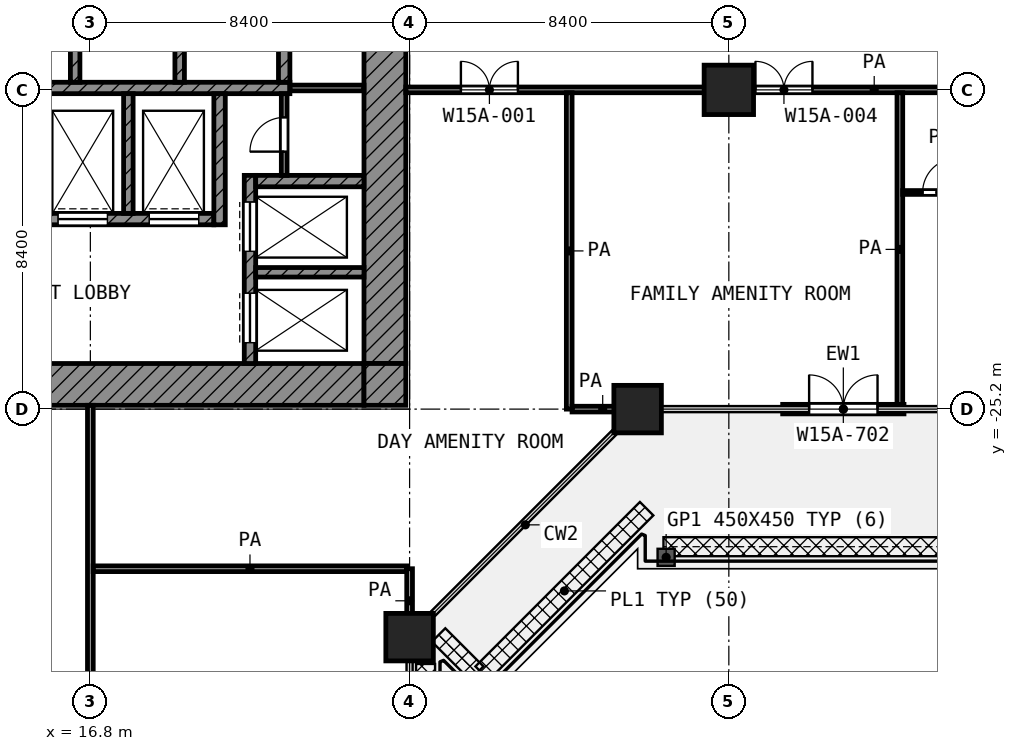
"""IFC4 building model, lengths in metres.
Left out: names, types, materials, properties, quantities, classifications, styles, units other than length and angle.
Written with IfcOpenShell. Run it as: python <this file> out.ifc"""

import sys

from ifc_helpers import new_model, si_unit, direction, frame, frame_2d, origin, origin_2d, place, context, subcontext, project, spatial, rectangle, extrude, element, fill, save


model = new_model("IFC4")
c1 = context("Model", 3, precision=1e-05, world=origin(), true_north=direction((0.0, 1.0)))
c2 = subcontext(c1, "Body", "Model", "MODEL_VIEW")
j1 = project(units=[si_unit("LENGTHUNIT", "METRE"), si_unit("PLANEANGLEUNIT", "RADIAN")], contexts=[c1])
p1 = place(None, origin())
s1 = spatial("IfcSite", under=j1, at=p1, CompositionType="ELEMENT")
p2 = place(p1, origin())
s2 = spatial("IfcBuilding", under=s1, at=p2, CompositionType="ELEMENT")
p3 = place(p2, frame((0.0, 0.0, 68.6)))
s3 = spatial("IfcBuildingStorey", under=s2, at=p3, CompositionType="ELEMENT", Elevation=68.6)
p4 = place(p3, frame((33.6, -16.8, 0.0), z_axis=(0.0, 0.0, 1.0), x_axis=(1.0, 0.0, 0.0)))
e1 = element("IfcColumn", 1, at=p4, inside=s3, PredefinedType="COLUMN", context=c2, shape_type="SweptSolid", body=[
    extrude(rectangle(XDim=1.3, YDim=1.3, at=origin_2d()), origin(), (0.0, 0.0, 1.0), 4.2),
])
for number, where, z_axis, x_axis in (
    (2, (31.2, -25.2, 0.0), (0.0, 0.0, 1.0), (1.0, 0.0, 0.0)),
    (3, (25.2, -31.2, 0.0), (0.0, 0.0, 1.0), (1.0, 0.0, 0.0)),
):
    element("IfcColumn", number, at=place(p3, frame(where, z_axis=z_axis, x_axis=x_axis)), inside=s3, PredefinedType="COLUMN", context=c2, shape_type="SweptSolid", body=[
        extrude(rectangle(XDim=1.25, YDim=1.25, at=origin_2d()), origin(), (0.0, 0.0, 1.0), 4.2),
    ])
p5 = place(p3, frame((35.017, -25.2, 0.0), z_axis=(0.0, 0.0, 1.0), x_axis=(1.0, 0.0, 0.0)))
e4 = element("IfcWall", 4, at=p5, inside=s3, PredefinedType="SOLIDWALL", context=c2, shape_type="SweptSolid", body=[
    extrude(rectangle(XDim=3.192, YDim=0.25, at=frame_2d((1.596, 0.0))), origin(), (0.0, 0.0, 1.0), 3.78),
])
p6 = place(p5, frame((0.696, 0.0, 0.0)))
e5 = element("IfcOpeningElement", 5, at=p6, cuts=e4, PredefinedType="OPENING", context=c2, shape_type="SweptSolid", body=[
    extrude(rectangle(XDim=1.8, YDim=2.1, at=frame_2d((0.9, 1.05))), frame((0.0, 0.135, 0.0), z_axis=(0.0, -1.0, 0.0), x_axis=(1.0, 0.0, 0.0)), (0.0, 0.0, 1.0), 0.27),
])
p7 = place(p3, frame((24.55, -24.0, 0.0), z_axis=(0.0, 0.0, 1.0), x_axis=(0.0, 1.0, 0.0)))
e6 = element("IfcWall", 6, at=p7, inside=s3, PredefinedType="SHEAR", context=c2, shape_type="SweptSolid", body=[
    extrude(rectangle(XDim=18.6, YDim=1.1, at=frame_2d((9.3, 0.0))), origin(), (0.0, 0.0, 1.0), 3.9),
])
p8 = place(p7, frame((10.5, 0.0, 0.0)))
e7 = element("IfcOpeningElement", 7, at=p8, cuts=e6, PredefinedType="OPENING", context=c2, shape_type="SweptSolid", body=[
    extrude(rectangle(XDim=1.8, YDim=2.1, at=frame_2d((0.9, 1.05))), frame((0.0, 0.56, 0.0), z_axis=(0.0, -1.0, 0.0), x_axis=(1.0, 0.0, 0.0)), (0.0, 0.0, 1.0), 1.12),
])
p9 = place(p3, frame((5.4, -24.55, 0.0), z_axis=(0.0, 0.0, 1.0), x_axis=(1.0, 0.0, 0.0)))
e8 = element("IfcWall", 8, at=p9, inside=s3, PredefinedType="SHEAR", context=c2, shape_type="SweptSolid", body=[
    extrude(rectangle(XDim=18.6, YDim=1.1, at=frame_2d((9.3, 0.0))), origin(), (0.0, 0.0, 1.0), 3.9),
])
p10 = place(p9, frame((6.3, 0.0, 0.0)))
e9 = element("IfcOpeningElement", 9, at=p10, cuts=e8, PredefinedType="OPENING", context=c2, shape_type="SweptSolid", body=[
    extrude(rectangle(XDim=1.8, YDim=2.1, at=frame_2d((0.9, 1.05))), frame((0.0, 0.56, 0.0), z_axis=(0.0, -1.0, 0.0), x_axis=(1.0, 0.0, 0.0)), (0.0, 0.0, 1.0), 1.12),
])
p11 = place(p3, frame((24.55, -25.1, 0.0), z_axis=(0.0, 0.0, 1.0), x_axis=(0.0, 1.0, 0.0)))
e10 = element("IfcWall", 10, at=p11, inside=s3, PredefinedType="SHEAR", context=c2, shape_type="SweptSolid", body=[
    extrude(rectangle(XDim=1.1, YDim=1.1, at=frame_2d((0.55, 0.0))), origin(), (0.0, 0.0, 1.0), 3.9),
])
p12 = place(p3, frame((5.4, -16.75, 0.0), z_axis=(0.0, 0.0, 1.0), x_axis=(1.0, 0.0, 0.0)))
e11 = element("IfcWall", 11, at=p12, inside=s3, PredefinedType="SHEAR", context=c2, shape_type="SweptSolid", body=[
    extrude(rectangle(XDim=16.65, YDim=0.3, at=frame_2d((8.325, 0.0))), origin(), (0.0, 0.0, 1.0), 3.9),
])
p13 = place(p3, frame((5.4, -20.2, 0.0), z_axis=(0.0, 0.0, 1.0), x_axis=(1.0, 0.0, 0.0)))
e12 = element("IfcWall", 12, at=p13, inside=s3, PredefinedType="SHEAR", context=c2, shape_type="SweptSolid", body=[
    extrude(rectangle(XDim=14.65, YDim=0.3, at=frame_2d((7.325, 0.0))), origin(), (0.0, 0.0, 1.0), 3.9),
])
p14 = place(p13, frame((10.55, 0.0, 0.0)))
e13 = element("IfcOpeningElement", 13, at=p14, cuts=e12, PredefinedType="OPENING", context=c2, shape_type="SweptSolid", body=[
    extrude(rectangle(XDim=1.3, YDim=2.1, at=frame_2d((0.65, 1.05))), frame((0.0, 0.16, 0.0), z_axis=(0.0, -1.0, 0.0), x_axis=(1.0, 0.0, 0.0)), (0.0, 0.0, 1.0), 0.32),
])
p15 = place(p13, frame((12.95, 0.0, 0.0)))
e14 = element("IfcOpeningElement", 14, at=p15, cuts=e12, PredefinedType="OPENING", context=c2, shape_type="SweptSolid", body=[
    extrude(rectangle(XDim=1.3, YDim=2.1, at=frame_2d((0.65, 1.05))), frame((0.0, 0.16, 0.0), z_axis=(0.0, -1.0, 0.0), x_axis=(1.0, 0.0, 0.0)), (0.0, 0.0, 1.0), 0.32),
])
p16 = place(p13, frame((0.55, 0.0, 0.0)))
e15 = element("IfcOpeningElement", 15, at=p16, cuts=e12, PredefinedType="OPENING", context=c2, shape_type="SweptSolid", body=[
    extrude(rectangle(XDim=1.3, YDim=2.1, at=frame_2d((0.65, 1.05))), frame((0.0, 0.16, 0.0), z_axis=(0.0, -1.0, 0.0), x_axis=(1.0, 0.0, 0.0)), (0.0, 0.0, 1.0), 0.32),
])
p17 = place(p13, frame((2.95, 0.0, 0.0)))
e16 = element("IfcOpeningElement", 16, at=p17, cuts=e12, PredefinedType="OPENING", context=c2, shape_type="SweptSolid", body=[
    extrude(rectangle(XDim=1.3, YDim=2.1, at=frame_2d((0.65, 1.05))), frame((0.0, 0.16, 0.0), z_axis=(0.0, -1.0, 0.0), x_axis=(1.0, 0.0, 0.0)), (0.0, 0.0, 1.0), 0.32),
])
p18 = place(p13, frame((5.95, 0.0, 0.0)))
e17 = element("IfcOpeningElement", 17, at=p18, cuts=e12, PredefinedType="OPENING", context=c2, shape_type="SweptSolid", body=[
    extrude(rectangle(XDim=0.9, YDim=2.1, at=frame_2d((0.45, 1.05))), frame((0.0, 0.16, 0.0), z_axis=(0.0, -1.0, 0.0), x_axis=(1.0, 0.0, 0.0)), (0.0, 0.0, 1.0), 0.32),
])
p19 = place(p13, frame((8.35, 0.0, 0.0)))
e18 = element("IfcOpeningElement", 18, at=p19, cuts=e12, PredefinedType="OPENING", context=c2, shape_type="SweptSolid", body=[
    extrude(rectangle(XDim=0.9, YDim=2.1, at=frame_2d((0.45, 1.05))), frame((0.0, 0.16, 0.0), z_axis=(0.0, -1.0, 0.0), x_axis=(1.0, 0.0, 0.0)), (0.0, 0.0, 1.0), 0.32),
])
p20 = place(p3, frame((20.2, -20.35, 0.0), z_axis=(0.0, 0.0, 1.0), x_axis=(0.0, 1.0, 0.0)))
e19 = element("IfcWall", 19, at=p20, inside=s3, PredefinedType="SHEAR", context=c2, shape_type="SweptSolid", body=[
    extrude(rectangle(XDim=3.45, YDim=0.3, at=frame_2d((1.725, 0.0))), origin(), (0.0, 0.0, 1.0), 3.9),
])
p21 = place(p3, frame((21.9, -16.6, 0.0), z_axis=(0.0, 0.0, 1.0), x_axis=(0.0, 1.0, 0.0)))
e20 = element("IfcWall", 20, at=p21, inside=s3, PredefinedType="SHEAR", context=c2, shape_type="SweptSolid", body=[
    extrude(rectangle(XDim=2.35, YDim=0.3, at=frame_2d((1.175, 0.0))), origin(), (0.0, 0.0, 1.0), 3.9),
])
p22 = place(p3, frame((21.15, -19.2, 0.0), z_axis=(0.0, 0.0, 1.0), x_axis=(1.0, 0.0, 0.0)))
e21 = element("IfcWall", 21, at=p22, inside=s3, PredefinedType="SHEAR", context=c2, shape_type="SweptSolid", body=[
    extrude(rectangle(XDim=2.85, YDim=0.3, at=frame_2d((1.425, 0.0))), origin(), (0.0, 0.0, 1.0), 3.9),
])
p23 = place(p3, frame((21.0, -24.0, 0.0), z_axis=(0.0, 0.0, 1.0), x_axis=(0.0, 1.0, 0.0)))
e22 = element("IfcWall", 22, at=p23, inside=s3, PredefinedType="SHEAR", context=c2, shape_type="SweptSolid", body=[
    extrude(rectangle(XDim=4.95, YDim=0.3, at=frame_2d((2.475, 0.0))), origin(), (0.0, 0.0, 1.0), 3.9),
])
p24 = place(p23, frame((2.95, 0.0, 0.0)))
e23 = element("IfcOpeningElement", 23, at=p24, cuts=e22, PredefinedType="OPENING", context=c2, shape_type="SweptSolid", body=[
    extrude(rectangle(XDim=1.3, YDim=2.1, at=frame_2d((0.65, 1.05))), frame((0.0, 0.16, 0.0), z_axis=(0.0, -1.0, 0.0), x_axis=(1.0, 0.0, 0.0)), (0.0, 0.0, 1.0), 0.32),
])
p25 = place(p23, frame((0.55, 0.0, 0.0)))
e24 = element("IfcOpeningElement", 24, at=p25, cuts=e22, PredefinedType="OPENING", context=c2, shape_type="SweptSolid", body=[
    extrude(rectangle(XDim=1.3, YDim=2.1, at=frame_2d((0.65, 1.05))), frame((0.0, 0.16, 0.0), z_axis=(0.0, -1.0, 0.0), x_axis=(1.0, 0.0, 0.0)), (0.0, 0.0, 1.0), 0.32),
])
p26 = place(p3, frame((21.15, -21.6, 0.0), z_axis=(0.0, 0.0, 1.0), x_axis=(1.0, 0.0, 0.0)))
e25 = element("IfcWall", 25, at=p26, inside=s3, PredefinedType="SHEAR", context=c2, shape_type="SweptSolid", body=[
    extrude(rectangle(XDim=2.85, YDim=0.25, at=frame_2d((1.425, 0.0))), origin(), (0.0, 0.0, 1.0), 3.9),
])
p27 = place(p3, frame((17.8, -20.05, 0.0), z_axis=(0.0, 0.0, 1.0), x_axis=(0.0, 1.0, 0.0)))
e26 = element("IfcWall", 26, at=p27, inside=s3, PredefinedType="SHEAR", context=c2, shape_type="SweptSolid", body=[
    extrude(rectangle(XDim=3.15, YDim=0.25, at=frame_2d((1.575, 0.0))), origin(), (0.0, 0.0, 1.0), 3.9),
])
for number, where, z_axis, x_axis in (
    (27, (16.4, -16.6, 0.0), (0.0, 0.0, 1.0), (0.0, 1.0, 0.0)),
    (28, (19.15, -16.6, 0.0), (0.0, 0.0, 1.0), (0.0, 1.0, 0.0)),
):
    element("IfcWall", number, at=place(p3, frame(where, z_axis=z_axis, x_axis=x_axis)), inside=s3, PredefinedType="SHEAR", context=c2, shape_type="SweptSolid", body=[
        extrude(rectangle(XDim=2.35, YDim=0.25, at=frame_2d((1.175, 0.0))), origin(), (0.0, 0.0, 1.0), 3.9),
    ])
p28 = place(p3, frame((21.9, -19.05, 0.0), z_axis=(0.0, 0.0, 1.0), x_axis=(0.0, 1.0, 0.0)))
e29 = element("IfcWall", 29, at=p28, inside=s3, PredefinedType="PARTITIONING", context=c2, shape_type="SweptSolid", body=[
    extrude(rectangle(XDim=2.15, YDim=0.15, at=frame_2d((1.075, 0.0))), origin(), (0.0, 0.0, 1.0), 3.9),
])
p29 = place(p28, frame((0.625, 0.0, 0.0)))
e30 = element("IfcOpeningElement", 30, at=p29, cuts=e29, PredefinedType="OPENING", context=c2, shape_type="SweptSolid", body=[
    extrude(rectangle(XDim=0.9, YDim=2.1, at=frame_2d((0.45, 1.05))), frame((0.0, 0.085, 0.0), z_axis=(0.0, -1.0, 0.0), x_axis=(1.0, 0.0, 0.0)), (0.0, 0.0, 1.0), 0.17),
])
p30 = place(p3, frame((22.05, -16.75, 0.0), z_axis=(0.0, 0.0, 1.0), x_axis=(1.0, 0.0, 0.0)))
e31 = element("IfcWall", 31, at=p30, inside=s3, PredefinedType="PARTITIONING", context=c2, shape_type="SweptSolid", body=[
    extrude(rectangle(XDim=1.95, YDim=0.15, at=frame_2d((0.975, 0.0))), origin(), (0.0, 0.0, 1.0), 3.9),
])
p31 = place(p3, frame((38.175, -19.5, 0.0), z_axis=(0.0, 0.0, 1.0), x_axis=(1.0, 0.0, 0.0)))
e32 = element("IfcWall", 32, at=p31, inside=s3, PredefinedType="PARTITIONING", context=c2, shape_type="SweptSolid", body=[
    extrude(rectangle(XDim=1.973, YDim=0.1, at=frame_2d((0.986, 0.0))), origin(), (0.0, 0.0, 1.0), 3.9),
])
p32 = place(p31, frame((0.524, 0.0, 0.0)))
e33 = element("IfcOpeningElement", 33, at=p32, cuts=e32, PredefinedType="OPENING", context=c2, shape_type="SweptSolid", body=[
    extrude(rectangle(XDim=0.9, YDim=2.1, at=frame_2d((0.45, 1.05))), frame((0.0, 0.06, 0.0), z_axis=(0.0, -1.0, 0.0), x_axis=(1.0, 0.0, 0.0)), (0.0, 0.0, 1.0), 0.12),
])
p33 = place(p3, frame((16.875, -29.4, 0.0), z_axis=(0.0, 0.0, 1.0), x_axis=(1.0, 0.0, 0.0)))
e34 = element("IfcWall", 34, at=p33, inside=s3, PredefinedType="PARTITIONING", context=c2, shape_type="SweptSolid", body=[
    extrude(rectangle(XDim=8.25, YDim=0.15, at=frame_2d((4.125, 0.0))), origin(), (0.0, 0.0, 1.0), 3.9),
])
p34 = place(p3, frame((29.475, -25.2, 0.0), z_axis=(0.0, 0.0, 1.0), x_axis=(1.0, 0.0, 0.0)))
e35 = element("IfcWall", 35, at=p34, inside=s3, PredefinedType="PARTITIONING", context=c2, shape_type="SweptSolid", body=[
    extrude(rectangle(XDim=1.612, YDim=0.15, at=frame_2d((0.806, 0.0))), origin(), (0.0, 0.0, 1.0), 3.9),
])
p35 = place(p3, frame((25.1, -16.8, 0.0), z_axis=(0.0, 0.0, 1.0), x_axis=(1.0, 0.0, 0.0)))
e36 = element("IfcWall", 36, at=p35, inside=s3, PredefinedType="PARTITIONING", context=c2, shape_type="SweptSolid", body=[
    extrude(rectangle(XDim=24.65, YDim=0.15, at=frame_2d((12.325, 0.0))), origin(), (0.0, 0.0, 1.0), 3.9),
])
p36 = place(p35, frame((1.45, 0.0, 0.0)))
e37 = element("IfcOpeningElement", 37, at=p36, cuts=e36, PredefinedType="OPENING", context=c2, shape_type="SweptSolid", body=[
    extrude(rectangle(XDim=1.5, YDim=2.1, at=frame_2d((0.75, 1.05))), frame((0.0, 0.085, 0.0), z_axis=(0.0, -1.0, 0.0), x_axis=(1.0, 0.0, 0.0)), (0.0, 0.0, 1.0), 0.17),
])
p37 = place(p35, frame((9.2, 0.0, 0.0)))
e38 = element("IfcOpeningElement", 38, at=p37, cuts=e36, PredefinedType="OPENING", context=c2, shape_type="SweptSolid", body=[
    extrude(rectangle(XDim=1.5, YDim=2.1, at=frame_2d((0.75, 1.05))), frame((0.0, 0.085, 0.0), z_axis=(0.0, -1.0, 0.0), x_axis=(1.0, 0.0, 0.0)), (0.0, 0.0, 1.0), 0.17),
])
p38 = place(p35, frame((18.1, 0.0, 0.0)))
e39 = element("IfcOpeningElement", 39, at=p38, cuts=e36, PredefinedType="OPENING", context=c2, shape_type="SweptSolid", body=[
    extrude(rectangle(XDim=1.2, YDim=2.1, at=frame_2d((0.6, 1.05))), frame((0.0, 0.085, 0.0), z_axis=(0.0, -1.0, 0.0), x_axis=(1.0, 0.0, 0.0)), (0.0, 0.0, 1.0), 0.17),
])
p39 = place(p35, frame((15.3, 0.0, 0.0)))
e40 = element("IfcOpeningElement", 40, at=p39, cuts=e36, PredefinedType="OPENING", context=c2, shape_type="SweptSolid", body=[
    extrude(rectangle(XDim=0.9, YDim=2.1, at=frame_2d((0.45, 1.05))), frame((0.0, 0.085, 0.0), z_axis=(0.0, -1.0, 0.0), x_axis=(1.0, 0.0, 0.0)), (0.0, 0.0, 1.0), 0.17),
])
p40 = place(p35, frame((23.25, 0.0, 0.0)))
e41 = element("IfcOpeningElement", 41, at=p40, cuts=e36, PredefinedType="OPENING", context=c2, shape_type="SweptSolid", body=[
    extrude(rectangle(XDim=1.2, YDim=2.1, at=frame_2d((0.6, 1.05))), frame((0.0, 0.085, 0.0), z_axis=(0.0, -1.0, 0.0), x_axis=(1.0, 0.0, 0.0)), (0.0, 0.0, 1.0), 0.17),
])
p41 = place(p3, frame((16.8, -50.398, 0.0), z_axis=(0.0, 0.0, 1.0), x_axis=(0.0, 1.0, 0.0)))
e42 = element("IfcWall", 42, at=p41, inside=s3, PredefinedType="PARTITIONING", context=c2, shape_type="SweptSolid", body=[
    extrude(rectangle(XDim=25.298, YDim=0.15, at=frame_2d((12.649, 0.0))), origin(), (0.0, 0.0, 1.0), 3.9),
])
p42 = place(p41, frame((14.598, 0.0, 0.0)))
e43 = element("IfcOpeningElement", 43, at=p42, cuts=e42, PredefinedType="OPENING", context=c2, shape_type="SweptSolid", body=[
    extrude(rectangle(XDim=1.5, YDim=2.1, at=frame_2d((0.75, 1.05))), frame((0.0, 0.085, 0.0), z_axis=(0.0, -1.0, 0.0), x_axis=(1.0, 0.0, 0.0)), (0.0, 0.0, 1.0), 0.17),
])
p43 = place(p41, frame((6.498, 0.0, 0.0)))
e44 = element("IfcOpeningElement", 44, at=p43, cuts=e42, PredefinedType="OPENING", context=c2, shape_type="SweptSolid", body=[
    extrude(rectangle(XDim=1.2, YDim=2.1, at=frame_2d((0.6, 1.05))), frame((0.0, 0.085, 0.0), z_axis=(0.0, -1.0, 0.0), x_axis=(1.0, 0.0, 0.0)), (0.0, 0.0, 1.0), 0.17),
])
p44 = place(p41, frame((5.048, 0.0, 0.0)))
e45 = element("IfcOpeningElement", 45, at=p44, cuts=e42, PredefinedType="OPENING", context=c2, shape_type="SweptSolid", body=[
    extrude(rectangle(XDim=1.1, YDim=2.1, at=frame_2d((0.55, 1.05))), frame((0.0, 0.085, 0.0), z_axis=(0.0, -1.0, 0.0), x_axis=(1.0, 0.0, 0.0)), (0.0, 0.0, 1.0), 0.17),
])
p45 = place(p41, frame((1.199, 0.0, 0.0)))
e46 = element("IfcOpeningElement", 46, at=p45, cuts=e42, PredefinedType="OPENING", context=c2, shape_type="SweptSolid", body=[
    extrude(rectangle(XDim=1.2, YDim=2.1, at=frame_2d((0.6, 1.05))), frame((0.0, 0.085, 0.0), z_axis=(0.0, -1.0, 0.0), x_axis=(1.0, 0.0, 0.0)), (0.0, 0.0, 1.0), 0.17),
])
p46 = place(p3, frame((25.2, -31.087, 0.0), z_axis=(0.0, 0.0, 1.0), x_axis=(0.0, 1.0, 0.0)))
e47 = element("IfcWall", 47, at=p46, inside=s3, PredefinedType="PARTITIONING", context=c2, shape_type="SweptSolid", body=[
    extrude(rectangle(XDim=1.687, YDim=0.15, at=frame_2d((0.844, 0.0))), origin(), (0.0, 0.0, 1.0), 3.9),
])
p47 = place(p3, frame((29.4, -25.2, 0.0), z_axis=(0.0, 0.0, 1.0), x_axis=(0.0, 1.0, 0.0)))
e48 = element("IfcWall", 48, at=p47, inside=s3, PredefinedType="PARTITIONING", context=c2, shape_type="SweptSolid", body=[
    extrude(rectangle(XDim=8.325, YDim=0.15, at=frame_2d((4.163, 0.0))), origin(), (0.0, 0.0, 1.0), 3.9),
])
p48 = place(p3, frame((38.1, -25.12, 0.0), z_axis=(0.0, 0.0, 1.0), x_axis=(0.0, 1.0, 0.0)))
e49 = element("IfcWall", 49, at=p48, inside=s3, PredefinedType="PARTITIONING", context=c2, shape_type="SweptSolid", body=[
    extrude(rectangle(XDim=8.245, YDim=0.15, at=frame_2d((4.123, 0.0))), origin(), (0.0, 0.0, 1.0), 3.9),
])
p49 = place(p6, origin())
e50 = element("IfcDoor", 50, at=p49, inside=s3, OperationType="DOUBLE_DOOR_SINGLE_SWING", PredefinedType="DOOR", context=c2, shape_type="SweptSolid", body=[
    extrude(rectangle(XDim=1.8, YDim=2.1, at=frame_2d((0.9, 1.05))), frame((0.0, 0.025, 0.0), z_axis=(0.0, -1.0, 0.0), x_axis=(1.0, 0.0, 0.0)), (0.0, 0.0, 1.0), 0.05),
])
fill(e5, e50)
p50 = place(p24, origin())
e51 = element("IfcDoor", 51, at=p50, inside=s3, OperationType="DOUBLE_DOOR_SLIDING", PredefinedType="DOOR", context=c2, shape_type="SweptSolid", body=[
    extrude(rectangle(XDim=1.3, YDim=2.1, at=frame_2d((0.65, 1.05))), frame((0.0, 0.025, 0.0), z_axis=(0.0, -1.0, 0.0), x_axis=(1.0, 0.0, 0.0)), (0.0, 0.0, 1.0), 0.05),
])
fill(e23, e51)
p51 = place(p25, origin())
e52 = element("IfcDoor", 52, at=p51, inside=s3, OperationType="DOUBLE_DOOR_SLIDING", PredefinedType="DOOR", context=c2, shape_type="SweptSolid", body=[
    extrude(rectangle(XDim=1.3, YDim=2.1, at=frame_2d((0.65, 1.05))), frame((0.0, 0.025, 0.0), z_axis=(0.0, -1.0, 0.0), x_axis=(1.0, 0.0, 0.0)), (0.0, 0.0, 1.0), 0.05),
])
fill(e24, e52)
p52 = place(p14, origin())
e53 = element("IfcDoor", 53, at=p52, inside=s3, OperationType="DOUBLE_DOOR_SLIDING", PredefinedType="DOOR", context=c2, shape_type="SweptSolid", body=[
    extrude(rectangle(XDim=1.3, YDim=2.1, at=frame_2d((0.65, 1.05))), frame((0.0, 0.025, 0.0), z_axis=(0.0, -1.0, 0.0), x_axis=(1.0, 0.0, 0.0)), (0.0, 0.0, 1.0), 0.05),
])
fill(e13, e53)
p53 = place(p15, origin())
e54 = element("IfcDoor", 54, at=p53, inside=s3, OperationType="DOUBLE_DOOR_SLIDING", PredefinedType="DOOR", context=c2, shape_type="SweptSolid", body=[
    extrude(rectangle(XDim=1.3, YDim=2.1, at=frame_2d((0.65, 1.05))), frame((0.0, 0.025, 0.0), z_axis=(0.0, -1.0, 0.0), x_axis=(1.0, 0.0, 0.0)), (0.0, 0.0, 1.0), 0.05),
])
fill(e14, e54)
p54 = place(p29, origin())
e55 = element("IfcDoor", 55, at=p54, inside=s3, OperationType="SINGLE_SWING_LEFT", PredefinedType="DOOR", context=c2, shape_type="SweptSolid", body=[
    extrude(rectangle(XDim=0.9, YDim=2.1, at=frame_2d((0.45, 1.05))), frame((0.0, 0.025, 0.0), z_axis=(0.0, -1.0, 0.0), x_axis=(1.0, 0.0, 0.0)), (0.0, 0.0, 1.0), 0.05),
])
fill(e30, e55)
p55 = place(p36, origin())
e56 = element("IfcDoor", 56, at=p55, inside=s3, OperationType="DOUBLE_DOOR_SINGLE_SWING", PredefinedType="DOOR", context=c2, shape_type="SweptSolid", body=[
    extrude(rectangle(XDim=1.5, YDim=2.1, at=frame_2d((0.75, 1.05))), frame((0.0, 0.025, 0.0), z_axis=(0.0, -1.0, 0.0), x_axis=(1.0, 0.0, 0.0)), (0.0, 0.0, 1.0), 0.05),
])
fill(e37, e56)
p56 = place(p37, origin())
e57 = element("IfcDoor", 57, at=p56, inside=s3, OperationType="DOUBLE_DOOR_SINGLE_SWING", PredefinedType="DOOR", context=c2, shape_type="SweptSolid", body=[
    extrude(rectangle(XDim=1.5, YDim=2.1, at=frame_2d((0.75, 1.05))), frame((0.0, 0.025, 0.0), z_axis=(0.0, -1.0, 0.0), x_axis=(1.0, 0.0, 0.0)), (0.0, 0.0, 1.0), 0.05),
])
fill(e38, e57)
p57 = place(p32, origin())
e58 = element("IfcDoor", 58, at=p57, inside=s3, OperationType="SINGLE_SWING_RIGHT", PredefinedType="DOOR", context=c2, shape_type="SweptSolid", body=[
    extrude(rectangle(XDim=0.9, YDim=2.1, at=frame_2d((0.45, 1.05))), frame((0.0, 0.025, 0.0), z_axis=(0.0, -1.0, 0.0), x_axis=(1.0, 0.0, 0.0)), (0.0, 0.0, 1.0), 0.05),
])
fill(e33, e58)
save(model, sys.argv[1])
